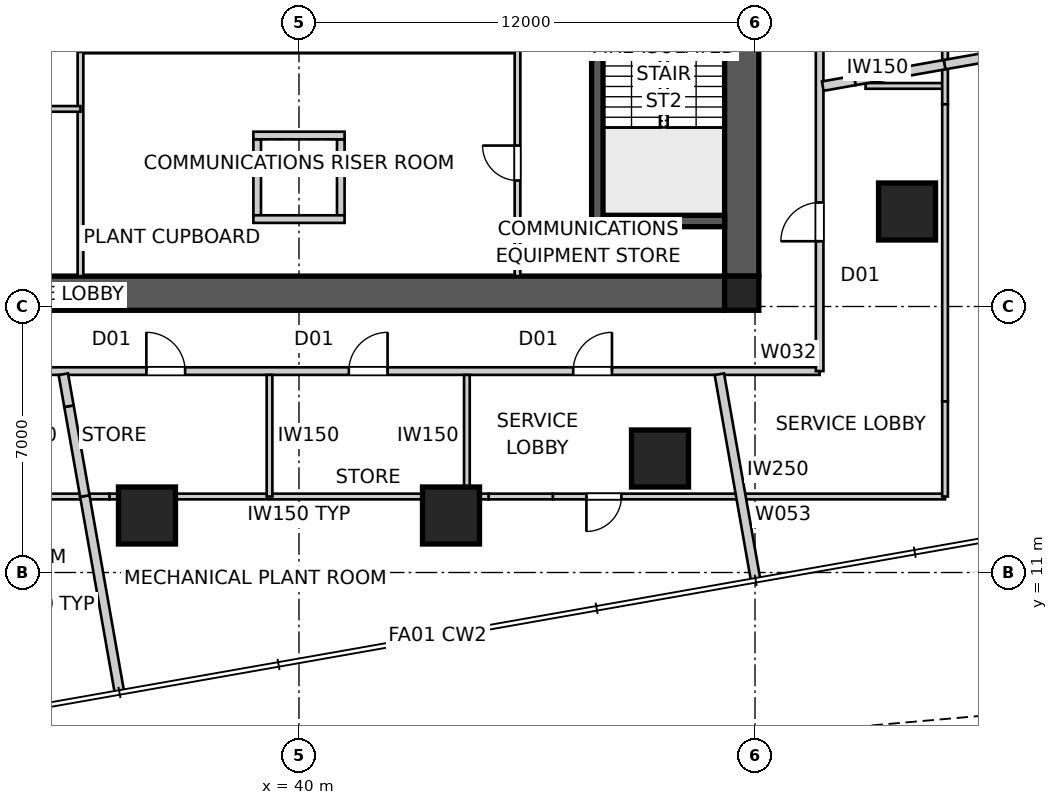
"""IFC4 building model, lengths in metres.
Left out: names, types, materials, properties, quantities, classifications, styles, units other than length and angle.
Written with IfcOpenShell. Run it as: python <this file> out.ifc"""

import sys

from ifc_helpers import new_model, si_unit, direction, frame, frame_2d, origin, origin_2d, place, context, subcontext, project, spatial, polyline, rectangle, outline, extrude, element, fill, save


model = new_model("IFC4")
c1 = context("Model", 3, precision=1e-05, world=origin(), true_north=direction((0.0, 1.0)))
c2 = subcontext(c1, "Body", "Model", "MODEL_VIEW")
j1 = project(units=[si_unit("LENGTHUNIT", "METRE"), si_unit("PLANEANGLEUNIT", "RADIAN")], contexts=[c1])
p1 = place(None, origin())
s1 = spatial("IfcSite", under=j1, at=p1, CompositionType="ELEMENT")
p2 = place(p1, origin())
s2 = spatial("IfcBuilding", under=s1, at=p2, CompositionType="ELEMENT")
p3 = place(p2, frame((0.0, 0.0, 74.4)))
s3 = spatial("IfcBuildingStorey", under=s2, at=p3, CompositionType="ELEMENT", Elevation=74.4)
p4 = place(p3, frame((51.2, 18.35, 0.0), z_axis=(0.0, 0.0, 1.0), x_axis=(-1.0, 0.0, 0.0)))
e1 = element("IfcWall", 1, at=p4, inside=s3, PredefinedType="SHEAR", context=c2, shape_type="SweptSolid", body=[
    extrude(outline(polyline([(0.0, -0.45), (22.4, -0.45), (22.4, -0.025), (22.85, -0.025), (22.85, 0.025), (22.4, 0.025), (22.4, 0.45), (0.0, 0.45), (0.0, 0.025), (-0.45, 0.025), (-0.45, -0.025), (0.0, -0.025), (0.0, -0.45)])), origin(), (0.0, 0.0, 1.0), 5.0),
])
p5 = place(p3, frame((51.65, 18.8, 0.0), z_axis=(0.0, 0.0, 1.0), x_axis=(0.0, 1.0, 0.0)))
e2 = element("IfcWall", 2, at=p5, inside=s3, PredefinedType="SHEAR", context=c2, shape_type="SweptSolid", body=[
    extrude(outline(polyline([(0.0, -0.45), (22.4, -0.45), (22.4, -0.025), (22.85, -0.025), (22.85, 0.025), (22.4, 0.025), (22.4, 0.45), (0.0, 0.45), (0.0, 0.025), (-0.45, 0.025), (-0.45, -0.025), (0.0, -0.025), (0.0, -0.45)])), origin(), (0.0, 0.0, 1.0), 5.0),
])
p6 = place(p5, frame((11.14, 0.0, 0.0)))
e3 = element("IfcOpeningElement", 3, at=p6, cuts=e2, PredefinedType="OPENING", context=c2, shape_type="SweptSolid", body=[
    extrude(rectangle(XDim=1.02, YDim=2.4, at=frame_2d((0.51, 1.2))), frame((0.0, 0.46, 0.0), z_axis=(0.0, -1.0, 0.0), x_axis=(1.0, 0.0, 0.0)), (0.0, 0.0, 1.0), 0.92),
])
p7 = place(p3, frame((47.85, 27.8, 0.0), z_axis=(0.0, 0.0, 1.0), x_axis=(0.0, -1.0, 0.0)))
e4 = element("IfcWall", 4, at=p7, inside=s3, PredefinedType="SHEAR", context=c2, shape_type="SweptSolid", body=[
    extrude(rectangle(XDim=7.7, YDim=0.3, at=frame_2d((3.85, 0.0))), origin(), (0.0, 0.0, 1.0), 5.0),
])
p8 = place(p3, frame((51.2, 20.25, 0.0), z_axis=(0.0, 0.0, 1.0), x_axis=(-1.0, 0.0, 0.0)))
e5 = element("IfcWall", 5, at=p8, inside=s3, PredefinedType="SHEAR", context=c2, shape_type="SweptSolid", body=[
    extrude(rectangle(XDim=3.5, YDim=0.3, at=frame_2d((1.75, 0.0))), origin(), (0.0, 0.0, 1.0), 5.0),
])
for number, where, z_axis, x_axis in (
    (6, (38.9, 22.4, 0.0), (0.0, 0.0, 1.0), (0.0, -1.0, 0.0)),
    (7, (41.1, 22.4, 0.0), (0.0, 0.0, 1.0), (0.0, -1.0, 0.0)),
):
    element("IfcWall", number, at=place(p3, frame(where, z_axis=z_axis, x_axis=x_axis)), inside=s3, PredefinedType="SOLIDWALL", context=c2, shape_type="SweptSolid", body=[
        extrude(rectangle(XDim=2.0, YDim=0.2, at=frame_2d((1.0, 0.0))), origin(), (0.0, 0.0, 1.0), 5.0),
    ])
for number, where, z_axis, x_axis in (
    (8, (38.8, 22.5, 0.0), (0.0, 0.0, 1.0), (1.0, 0.0, 0.0)),
    (9, (38.8, 20.3, 0.0), (0.0, 0.0, 1.0), (1.0, 0.0, 0.0)),
):
    element("IfcWall", number, at=place(p3, frame(where, z_axis=z_axis, x_axis=x_axis)), inside=s3, PredefinedType="SOLIDWALL", context=c2, shape_type="SweptSolid", body=[
        extrude(rectangle(XDim=2.4, YDim=0.2, at=frame_2d((1.2, 0.0))), origin(), (0.0, 0.0, 1.0), 5.0),
    ])
p9 = place(p3, frame((51.65, 18.35, 0.0), z_axis=(0.0, 0.0, 1.0), x_axis=(1.0, 0.0, 0.0)))
e10 = element("IfcColumn", 10, at=p9, inside=s3, PredefinedType="COLUMN", context=c2, shape_type="SweptSolid", body=[
    extrude(rectangle(XDim=0.9, YDim=0.9, at=origin_2d()), origin(), (0.0, 0.0, 1.0), 5.0),
])
for number, where, z_axis, x_axis in (
    (11, (36.0, 12.5, 0.0), (0.0, 0.0, 1.0), (1.0, 0.0, 0.0)),
    (12, (44.0, 12.5, 0.0), (0.0, 0.0, 1.0), (1.0, 0.0, 0.0)),
    (13, (49.5, 14.0, 0.0), (0.0, 0.0, 1.0), (1.0, 0.0, 0.0)),
    (14, (56.0, 20.5, 0.0), (0.0, 0.0, 1.0), (1.0, 0.0, 0.0)),
):
    element("IfcColumn", number, at=place(p3, frame(where, z_axis=z_axis, x_axis=x_axis)), inside=s3, PredefinedType="COLUMN", context=c2, shape_type="SweptSolid", body=[
        extrude(rectangle(XDim=1.5, YDim=1.5, at=origin_2d()), origin(), (0.0, 0.0, 1.0), 5.0),
    ])
p10 = place(p3, frame((26.3, 16.3, 0.0), z_axis=(0.0, 0.0, 1.0), x_axis=(1.0, 0.0, 0.0)))
e15 = element("IfcWall", 15, at=p10, inside=s3, PredefinedType="PARTITIONING", context=c2, shape_type="SweptSolid", body=[
    extrude(rectangle(XDim=27.4, YDim=0.2, at=frame_2d((13.7, 0.0))), origin(), (0.0, 0.0, 1.0), 4.85),
])
p11 = place(p10, frame((20.916, 0.0, 0.0)))
e16 = element("IfcOpeningElement", 16, at=p11, cuts=e15, PredefinedType="OPENING", context=c2, shape_type="SweptSolid", body=[
    extrude(rectangle(XDim=1.02, YDim=2.34, at=frame_2d((0.51, 1.17))), frame((0.0, 0.11, 0.0), z_axis=(0.0, -1.0, 0.0), x_axis=(1.0, 0.0, 0.0)), (0.0, 0.0, 1.0), 0.22),
])
p12 = place(p10, frame((9.684, 0.0, 0.0)))
e17 = element("IfcOpeningElement", 17, at=p12, cuts=e15, PredefinedType="OPENING", context=c2, shape_type="SweptSolid", body=[
    extrude(rectangle(XDim=1.02, YDim=2.34, at=frame_2d((0.51, 1.17))), frame((0.0, 0.11, 0.0), z_axis=(0.0, -1.0, 0.0), x_axis=(1.0, 0.0, 0.0)), (0.0, 0.0, 1.0), 0.22),
])
p13 = place(p10, frame((15.011, 0.0, 0.0)))
e18 = element("IfcOpeningElement", 18, at=p13, cuts=e15, PredefinedType="OPENING", context=c2, shape_type="SweptSolid", body=[
    extrude(rectangle(XDim=1.02, YDim=2.34, at=frame_2d((0.51, 1.17))), frame((0.0, 0.11, 0.0), z_axis=(0.0, -1.0, 0.0), x_axis=(1.0, 0.0, 0.0)), (0.0, 0.0, 1.0), 0.22),
])
p14 = place(p10, frame((2.604, 0.0, 0.0)))
e19 = element("IfcOpeningElement", 19, at=p14, cuts=e15, PredefinedType="OPENING", context=c2, shape_type="SweptSolid", body=[
    extrude(rectangle(XDim=1.02, YDim=2.34, at=frame_2d((0.51, 1.17))), frame((0.0, 0.11, 0.0), z_axis=(0.0, -1.0, 0.0), x_axis=(1.0, 0.0, 0.0)), (0.0, 0.0, 1.0), 0.22),
])
p15 = place(p10, frame((5.968, 0.0, 0.0)))
e20 = element("IfcOpeningElement", 20, at=p15, cuts=e15, PredefinedType="OPENING", context=c2, shape_type="SweptSolid", body=[
    extrude(rectangle(XDim=1.02, YDim=2.34, at=frame_2d((0.51, 1.17))), frame((0.0, 0.11, 0.0), z_axis=(0.0, -1.0, 0.0), x_axis=(1.0, 0.0, 0.0)), (0.0, 0.0, 1.0), 0.22),
])
p16 = place(p3, frame((53.7, 16.3, 0.0), z_axis=(0.0, 0.0, 1.0), x_axis=(0.0, 1.0, 0.0)))
e21 = element("IfcWall", 21, at=p16, inside=s3, PredefinedType="PARTITIONING", context=c2, shape_type="SweptSolid", body=[
    extrude(rectangle(XDim=27.4, YDim=0.2, at=frame_2d((13.7, 0.0))), origin(), (0.0, 0.0, 1.0), 4.85),
])
p17 = place(p16, frame((19.587, 0.0, 0.0)))
e22 = element("IfcOpeningElement", 22, at=p17, cuts=e21, PredefinedType="OPENING", context=c2, shape_type="SweptSolid", body=[
    extrude(rectangle(XDim=1.02, YDim=2.34, at=frame_2d((0.51, 1.17))), frame((0.0, 0.11, 0.0), z_axis=(0.0, -1.0, 0.0), x_axis=(1.0, 0.0, 0.0)), (0.0, 0.0, 1.0), 0.22),
])
p18 = place(p16, frame((10.973, 0.0, 0.0)))
e23 = element("IfcOpeningElement", 23, at=p18, cuts=e21, PredefinedType="OPENING", context=c2, shape_type="SweptSolid", body=[
    extrude(rectangle(XDim=1.02, YDim=2.34, at=frame_2d((0.51, 1.17))), frame((0.0, 0.11, 0.0), z_axis=(0.0, -1.0, 0.0), x_axis=(1.0, 0.0, 0.0)), (0.0, 0.0, 1.0), 0.22),
])
p19 = place(p16, frame((3.417, 0.0, 0.0)))
e24 = element("IfcOpeningElement", 24, at=p19, cuts=e21, PredefinedType="OPENING", context=c2, shape_type="SweptSolid", body=[
    extrude(rectangle(XDim=1.02, YDim=2.34, at=frame_2d((0.51, 1.17))), frame((0.0, 0.11, 0.0), z_axis=(0.0, -1.0, 0.0), x_axis=(1.0, 0.0, 0.0)), (0.0, 0.0, 1.0), 0.22),
])
p20 = place(p3, frame((35.276, 7.843, 0.0), z_axis=(0.0, 0.0, 1.0), x_axis=(-0.173615529166, 0.984813509266, 0.0)))
e25 = element("IfcWall", 25, at=p20, inside=s3, PredefinedType="PARTITIONING", context=c2, shape_type="SweptSolid", body=[
    extrude(rectangle(XDim=5.25, YDim=0.25, at=frame_2d((2.625, 0.0))), origin(), (0.0, 0.0, 1.0), 4.85),
])
p21 = place(p3, frame((34.364, 13.013, 0.0), z_axis=(0.0, 0.0, 1.0), x_axis=(-0.17362866226, 0.984811193906, 0.0)))
e26 = element("IfcWall", 26, at=p21, inside=s3, PredefinedType="PARTITIONING", context=c2, shape_type="SweptSolid", body=[
    extrude(rectangle(XDim=2.4, YDim=0.25, at=frame_2d((1.2, 0.0))), origin(), (0.0, 0.0, 1.0), 4.322),
])
p22 = place(p3, frame((33.948, 15.376, 0.0), z_axis=(0.0, 0.0, 1.0), x_axis=(-0.173752728326, 0.984789312188, 0.0)))
e27 = element("IfcWall", 27, at=p22, inside=s3, PredefinedType="PARTITIONING", context=c2, shape_type="SweptSolid", body=[
    extrude(rectangle(XDim=0.854, YDim=0.25, at=frame_2d((0.427, 0.0))), origin(), (0.0, 0.0, 1.0), 4.85),
])
p23 = place(p3, frame((52.018, 10.795, 0.0), z_axis=(0.0, 0.0, 1.0), x_axis=(-0.173674040102, 0.984803192417, 0.0)))
e28 = element("IfcWall", 28, at=p23, inside=s3, PredefinedType="PARTITIONING", context=c2, shape_type="SweptSolid", body=[
    extrude(rectangle(XDim=5.506, YDim=0.25, at=frame_2d((2.753, 0.0))), origin(), (0.0, 0.0, 1.0), 4.85),
])
p24 = place(p3, frame((62.157, 25.276, 0.0), z_axis=(0.0, 0.0, 1.0), x_axis=(-0.984813509266, -0.173615529166, 0.0)))
e29 = element("IfcWall", 29, at=p24, inside=s3, PredefinedType="PARTITIONING", context=c2, shape_type="SweptSolid", body=[
    extrude(rectangle(XDim=5.25, YDim=0.25, at=frame_2d((2.625, 0.0))), origin(), (0.0, 0.0, 1.0), 4.85),
])
p25 = place(p3, frame((56.987, 24.364, 0.0), z_axis=(0.0, 0.0, 1.0), x_axis=(-0.984811193906, -0.17362866226, 0.0)))
e30 = element("IfcWall", 30, at=p25, inside=s3, PredefinedType="PARTITIONING", context=c2, shape_type="SweptSolid", body=[
    extrude(rectangle(XDim=2.4, YDim=0.25, at=frame_2d((1.2, 0.0))), origin(), (0.0, 0.0, 1.0), 4.322),
])
p26 = place(p3, frame((54.624, 23.948, 0.0), z_axis=(0.0, 0.0, 1.0), x_axis=(-0.984789312188, -0.173752728326, 0.0)))
e31 = element("IfcWall", 31, at=p26, inside=s3, PredefinedType="PARTITIONING", context=c2, shape_type="SweptSolid", body=[
    extrude(rectangle(XDim=0.854, YDim=0.25, at=frame_2d((0.427, 0.0))), origin(), (0.0, 0.0, 1.0), 4.85),
])
p27 = place(p3, frame((45.75, 18.8, 0.0), z_axis=(0.0, 0.0, 1.0), x_axis=(0.0, 1.0, 0.0)))
e32 = element("IfcWall", 32, at=p27, inside=s3, PredefinedType="SOLIDWALL", context=c2, shape_type="SweptSolid", body=[
    extrude(rectangle(XDim=5.95, YDim=0.15, at=frame_2d((2.975, 0.0))), origin(), (0.0, 0.0, 1.0), 4.85),
])
p28 = place(p27, frame((2.515, 0.0, 0.0)))
e33 = element("IfcOpeningElement", 33, at=p28, cuts=e32, PredefinedType="OPENING", context=c2, shape_type="SweptSolid", body=[
    extrude(rectangle(XDim=0.92, YDim=2.1, at=frame_2d((0.46, 1.05))), frame((0.0, 0.085, 0.0), z_axis=(0.0, -1.0, 0.0), x_axis=(1.0, 0.0, 0.0)), (0.0, 0.0, 1.0), 0.17),
])
p29 = place(p3, frame((34.25, 18.8, 0.0), z_axis=(0.0, 0.0, 1.0), x_axis=(0.0, 1.0, 0.0)))
e34 = element("IfcWall", 34, at=p29, inside=s3, PredefinedType="SOLIDWALL", context=c2, shape_type="SweptSolid", body=[
    extrude(rectangle(XDim=5.9, YDim=0.15, at=frame_2d((2.95, 0.0))), origin(), (0.0, 0.0, 1.0), 4.85),
])
p30 = place(p3, frame((34.25, 23.2, 0.0), z_axis=(0.0, 0.0, 1.0), x_axis=(-1.0, 0.0, 0.0)))
e35 = element("IfcWall", 35, at=p30, inside=s3, PredefinedType="SOLIDWALL", context=c2, shape_type="SweptSolid", body=[
    extrude(rectangle(XDim=5.45, YDim=0.15, at=frame_2d((2.725, 0.0))), origin(), (0.0, 0.0, 1.0), 4.85),
])
p31 = place(p30, frame((2.265, 0.0, 0.0)))
e36 = element("IfcOpeningElement", 36, at=p31, cuts=e35, PredefinedType="OPENING", context=c2, shape_type="SweptSolid", body=[
    extrude(rectangle(XDim=0.92, YDim=2.1, at=frame_2d((0.46, 1.05))), frame((0.0, 0.085, 0.0), z_axis=(0.0, -1.0, 0.0), x_axis=(1.0, 0.0, 0.0)), (0.0, 0.0, 1.0), 0.17),
])
p32 = place(p3, frame((57.0, 13.0, 0.0), z_axis=(0.0, 0.0, 1.0), x_axis=(-1.0, 0.0, 0.0)))
e37 = element("IfcWall", 37, at=p32, inside=s3, PredefinedType="SOLIDWALL", context=c2, shape_type="SweptSolid", body=[
    extrude(rectangle(XDim=10.322, YDim=0.15, at=frame_2d((5.161, 0.0))), origin(), (0.0, 0.0, 1.0), 4.85),
])
p33 = place(p32, frame((8.517, 0.0, 0.0)))
e38 = element("IfcOpeningElement", 38, at=p33, cuts=e37, PredefinedType="OPENING", context=c2, shape_type="SweptSolid", body=[
    extrude(rectangle(XDim=0.92, YDim=2.1, at=frame_2d((0.46, 1.05))), frame((0.0, 0.085, 0.0), z_axis=(0.0, -1.0, 0.0), x_axis=(1.0, 0.0, 0.0)), (0.0, 0.0, 1.0), 0.17),
])
p34 = place(p3, frame((46.678, 13.0, 0.0), z_axis=(0.0, 0.0, 1.0), x_axis=(-1.0, 0.0, 0.0)))
e39 = element("IfcWall", 39, at=p34, inside=s3, PredefinedType="SOLIDWALL", context=c2, shape_type="SweptSolid", body=[
    extrude(rectangle(XDim=1.69, YDim=0.15, at=frame_2d((0.845, 0.0))), origin(), (0.0, 0.0, 1.0), 3.85),
])
p35 = place(p3, frame((44.988, 13.0, 0.0), z_axis=(0.0, 0.0, 1.0), x_axis=(-1.0, 0.0, 0.0)))
e40 = element("IfcWall", 40, at=p35, inside=s3, PredefinedType="SOLIDWALL", context=c2, shape_type="SweptSolid", body=[
    extrude(rectangle(XDim=9.977, YDim=0.15, at=frame_2d((4.988, 0.0))), origin(), (0.0, 0.0, 1.0), 4.85),
])
p36 = place(p3, frame((35.012, 13.0, 0.0), z_axis=(0.0, 0.0, 1.0), x_axis=(-1.0, 0.0, 0.0)))
e41 = element("IfcWall", 41, at=p36, inside=s3, PredefinedType="SOLIDWALL", context=c2, shape_type="SweptSolid", body=[
    extrude(rectangle(XDim=1.69, YDim=0.15, at=frame_2d((0.845, 0.0))), origin(), (0.0, 0.0, 1.0), 3.85),
])
for number, where, z_axis, x_axis in (
    (42, (44.418, 13.0, 0.0), (0.0, 0.0, 1.0), (0.0, 1.0, 0.0)),
    (43, (39.225, 16.2, 0.0), (0.0, 0.0, 1.0), (0.0, -1.0, 0.0)),
):
    element("IfcWall", number, at=place(p3, frame(where, z_axis=z_axis, x_axis=x_axis)), inside=s3, PredefinedType="SOLIDWALL", context=c2, shape_type="SweptSolid", body=[
        extrude(rectangle(XDim=3.2, YDim=0.15, at=frame_2d((1.6, 0.0))), origin(), (0.0, 0.0, 1.0), 4.85),
    ])
p37 = place(p3, frame((54.908, 23.805, 0.0), z_axis=(0.0, 0.0, 1.0), x_axis=(1.0, 0.0, 0.0)))
e44 = element("IfcWall", 44, at=p37, inside=s3, PredefinedType="SOLIDWALL", context=c2, shape_type="SweptSolid", body=[
    extrude(rectangle(XDim=2.092, YDim=0.15, at=frame_2d((1.046, 0.0))), origin(), (0.0, 0.0, 1.0), 4.85),
])
p38 = place(p3, frame((57.0, 25.012, 0.0), z_axis=(0.0, 0.0, 1.0), x_axis=(0.0, -1.0, 0.0)))
e45 = element("IfcWall", 45, at=p38, inside=s3, PredefinedType="SOLIDWALL", context=c2, shape_type="SweptSolid", body=[
    extrude(rectangle(XDim=1.69, YDim=0.15, at=frame_2d((0.845, 0.0))), origin(), (0.0, 0.0, 1.0), 3.85),
])
p39 = place(p3, frame((57.0, 23.322, 0.0), z_axis=(0.0, 0.0, 1.0), x_axis=(0.0, -1.0, 0.0)))
e46 = element("IfcWall", 46, at=p39, inside=s3, PredefinedType="SOLIDWALL", context=c2, shape_type="SweptSolid", body=[
    extrude(rectangle(XDim=7.821, YDim=0.15, at=frame_2d((3.911, 0.0))), origin(), (0.0, 0.0, 1.0), 4.85),
])
p40 = place(p3, frame((57.0, 15.5, 0.0), z_axis=(0.0, 0.0, 1.0), x_axis=(0.0, -1.0, 0.0)))
e47 = element("IfcWall", 47, at=p40, inside=s3, PredefinedType="SOLIDWALL", context=c2, shape_type="SweptSolid", body=[
    extrude(rectangle(XDim=2.5, YDim=0.15, at=frame_2d((1.25, 0.0))), origin(), (0.0, 0.0, 1.0), 4.049),
])
p41 = place(p19, origin())
e48 = element("IfcDoor", 48, at=p41, inside=s3, OperationType="SINGLE_SWING_LEFT", PredefinedType="DOOR", context=c2, shape_type="SweptSolid", body=[
    extrude(rectangle(XDim=1.02, YDim=2.34, at=frame_2d((0.51, 1.17))), frame((0.0, 0.025, 0.0), z_axis=(0.0, -1.0, 0.0), x_axis=(1.0, 0.0, 0.0)), (0.0, 0.0, 1.0), 0.05),
])
fill(e24, e48)
p42 = place(p11, origin())
e49 = element("IfcDoor", 49, at=p42, inside=s3, OperationType="SINGLE_SWING_RIGHT", PredefinedType="DOOR", context=c2, shape_type="SweptSolid", body=[
    extrude(rectangle(XDim=1.02, YDim=2.34, at=frame_2d((0.51, 1.17))), frame((0.0, 0.025, 0.0), z_axis=(0.0, -1.0, 0.0), x_axis=(1.0, 0.0, 0.0)), (0.0, 0.0, 1.0), 0.05),
])
fill(e16, e49)
p43 = place(p12, origin())
e50 = element("IfcDoor", 50, at=p43, inside=s3, OperationType="SINGLE_SWING_LEFT", PredefinedType="DOOR", context=c2, shape_type="SweptSolid", body=[
    extrude(rectangle(XDim=1.02, YDim=2.34, at=frame_2d((0.51, 1.17))), frame((0.0, 0.025, 0.0), z_axis=(0.0, -1.0, 0.0), x_axis=(1.0, 0.0, 0.0)), (0.0, 0.0, 1.0), 0.05),
])
fill(e17, e50)
p44 = place(p13, origin())
e51 = element("IfcDoor", 51, at=p44, inside=s3, OperationType="SINGLE_SWING_RIGHT", PredefinedType="DOOR", context=c2, shape_type="SweptSolid", body=[
    extrude(rectangle(XDim=1.02, YDim=2.34, at=frame_2d((0.51, 1.17))), frame((0.0, 0.025, 0.0), z_axis=(0.0, -1.0, 0.0), x_axis=(1.0, 0.0, 0.0)), (0.0, 0.0, 1.0), 0.05),
])
fill(e18, e51)
p45 = place(p28, origin())
e52 = element("IfcDoor", 52, at=p45, inside=s3, OperationType="SINGLE_SWING_RIGHT", PredefinedType="DOOR", context=c2, shape_type="SweptSolid", body=[
    extrude(rectangle(XDim=0.92, YDim=2.1, at=frame_2d((0.46, 1.05))), frame((0.0, 0.025, 0.0), z_axis=(0.0, -1.0, 0.0), x_axis=(1.0, 0.0, 0.0)), (0.0, 0.0, 1.0), 0.05),
])
fill(e33, e52)
p46 = place(p33, origin())
e53 = element("IfcDoor", 53, at=p46, inside=s3, OperationType="SINGLE_SWING_RIGHT", PredefinedType="DOOR", context=c2, shape_type="SweptSolid", body=[
    extrude(rectangle(XDim=0.92, YDim=2.1, at=frame_2d((0.46, 1.05))), frame((0.0, 0.025, 0.0), z_axis=(0.0, -1.0, 0.0), x_axis=(1.0, 0.0, 0.0)), (0.0, 0.0, 1.0), 0.05),
])
fill(e38, e53)
save(model, sys.argv[1])
